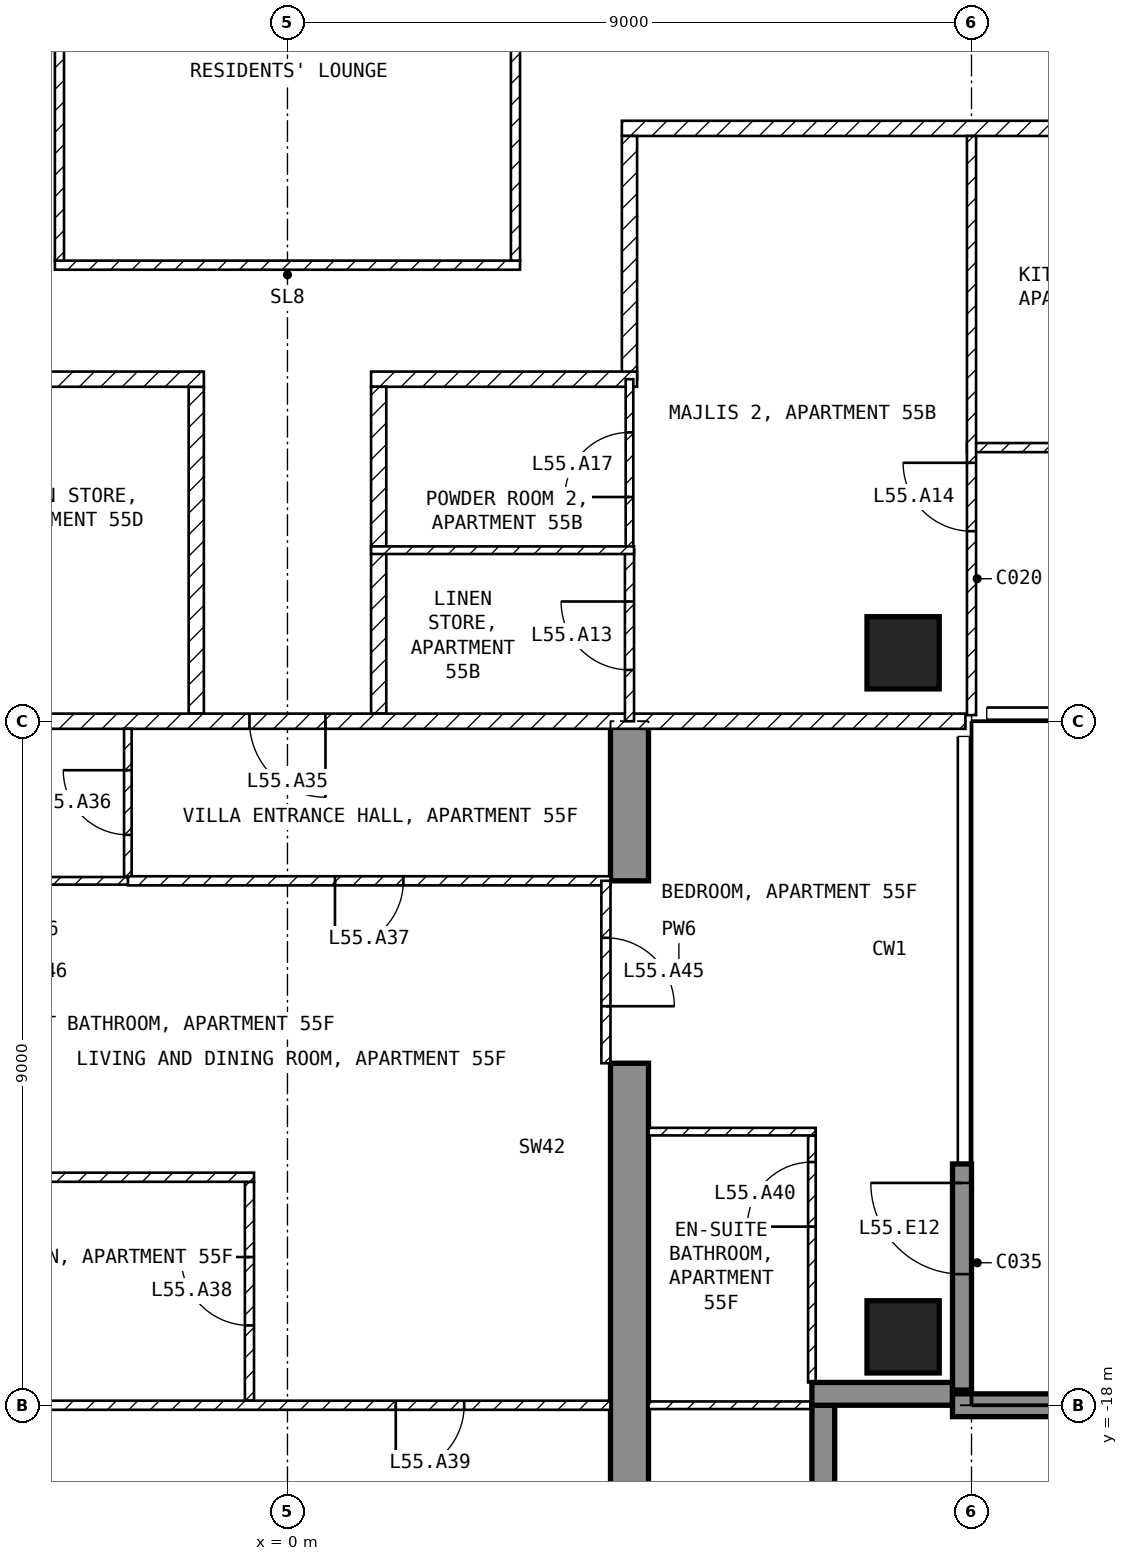
"""IFC4 building model, lengths in metres.
Left out: names, types, materials, properties, quantities, classifications, styles, units other than length and angle.
Written with IfcOpenShell. Run it as: python <this file> out.ifc"""

import sys

from ifc_helpers import new_model, si_unit, direction, frame, frame_2d, origin, origin_2d, place, context, subcontext, project, spatial, polyline, rectangle, outline, extrude, element, fill, save


model = new_model("IFC4")
c1 = context("Model", 3, precision=1e-05, world=origin(), true_north=direction((0.0, 1.0)))
c2 = subcontext(c1, "Body", "Model", "MODEL_VIEW")
j1 = project(units=[si_unit("LENGTHUNIT", "METRE"), si_unit("PLANEANGLEUNIT", "RADIAN")], contexts=[c1])
p1 = place(None, origin())
s1 = spatial("IfcSite", under=j1, at=p1, CompositionType="ELEMENT")
p2 = place(p1, origin())
s2 = spatial("IfcBuilding", under=s1, at=p2, CompositionType="ELEMENT")
p3 = place(p2, frame((0.0, 0.0, 219.1)))
s3 = spatial("IfcBuildingStorey", under=s2, at=p3, CompositionType="ELEMENT", Elevation=219.1)
for number, where, z_axis, x_axis in (
    (1, (8.1, -17.1, -0.25), (0.0, 0.0, 1.0), (1.0, 0.0, 0.0)),
    (2, (8.1, -8.1, -0.25), (0.0, 0.0, 1.0), (1.0, 0.0, 0.0)),
):
    element("IfcColumn", number, at=place(p3, frame(where, z_axis=z_axis, x_axis=x_axis)), inside=s3, PredefinedType="COLUMN", context=c2, shape_type="SweptSolid", body=[
        extrude(rectangle(XDim=0.95, YDim=0.95, at=origin_2d()), origin(), (0.0, 0.0, 1.0), 3.45),
    ])
p4 = place(p3, frame((4.25, -20.225, -0.25), z_axis=(1.0, 0.0, 0.0), x_axis=(0.0, 1.0, 0.0)))
e3 = element("IfcWall", 3, at=p4, inside=s3, PredefinedType="SHEAR", context=c2, shape_type="SweptSolid", body=[
    extrude(outline(polyline([(0.0, 0.0), (6.725, 0.0), (6.725, 2.65), (9.125, 2.65), (9.125, 0.0), (11.225, 0.0), (11.225, 3.45), (0.0, 3.45), (0.0, 0.0)])), origin(), (0.0, 0.0, 1.0), 0.5),
])
p5 = place(p3, frame((8.875, -17.8, 0.0), z_axis=(0.0, 0.0, 1.0), x_axis=(0.0, 1.0, 0.0)))
e4 = element("IfcWall", 4, at=p5, inside=s3, PredefinedType="SOLIDWALL", context=c2, shape_type="SweptSolid", body=[
    extrude(rectangle(XDim=2.975, YDim=0.25, at=frame_2d((1.488, 0.0))), origin(), (0.0, 0.0, 1.0), 3.2),
])
p6 = place(p5, frame((1.525, 0.0, 0.0)))
e5 = element("IfcOpeningElement", 5, at=p6, cuts=e4, PredefinedType="OPENING", context=c2, shape_type="SweptSolid", body=[
    extrude(rectangle(XDim=1.2, YDim=2.4, at=frame_2d((0.6, 1.2))), frame((0.0, 0.135, 0.0), z_axis=(0.0, -1.0, 0.0), x_axis=(1.0, 0.0, 0.0)), (0.0, 0.0, 1.0), 0.27),
])
p7 = place(p3, frame((7.05, -19.8, 0.0), z_axis=(0.0, 0.0, 1.0), x_axis=(0.0, 1.0, 0.0)))
e6 = element("IfcWall", 6, at=p7, inside=s3, PredefinedType="SOLIDWALL", context=c2, shape_type="SweptSolid", body=[
    extrude(rectangle(XDim=1.8, YDim=0.3, at=frame_2d((0.9, 0.0))), origin(), (0.0, 0.0, 1.0), 3.2),
])
p8 = place(p3, frame((6.9, -17.85, 0.0), z_axis=(0.0, 0.0, 1.0), x_axis=(1.0, 0.0, 0.0)))
e7 = element("IfcWall", 7, at=p8, inside=s3, PredefinedType="SOLIDWALL", context=c2, shape_type="SweptSolid", body=[
    extrude(rectangle(XDim=1.85, YDim=0.3, at=frame_2d((0.925, 0.0))), origin(), (0.0, 0.0, 1.0), 3.2),
])
p9 = place(p3, frame((8.75, -18.0, 0.0), z_axis=(0.0, 0.0, 1.0), x_axis=(1.0, 0.0, 0.0)))
e8 = element("IfcWall", 8, at=p9, inside=s3, PredefinedType="SOLIDWALL", context=c2, shape_type="SweptSolid", body=[
    extrude(rectangle(XDim=2.95, YDim=0.3, at=frame_2d((1.475, 0.0))), origin(), (0.0, 0.0, 1.0), 3.2),
])
p10 = place(p3, frame((-3.06, -3.0, 0.0), z_axis=(0.0, 0.0, 1.0), x_axis=(1.0, 0.0, 0.0)))
e9 = element("IfcWall", 9, at=p10, inside=s3, PredefinedType="PARTITIONING", context=c2, shape_type="SweptSolid", body=[
    extrude(rectangle(XDim=6.12, YDim=0.12, at=frame_2d((3.06, 0.0))), origin(), (0.0, 0.0, 1.0), 3.2),
])
for number, where, z_axis, x_axis in (
    (10, (3.0, -2.94, 0.0), (0.0, 0.0, 1.0), (0.0, 1.0, 0.0)),
    (11, (-3.0, 2.94, 0.0), (0.0, 0.0, 1.0), (0.0, -1.0, 0.0)),
):
    element("IfcWall", number, at=place(p3, frame(where, z_axis=z_axis, x_axis=x_axis)), inside=s3, PredefinedType="PARTITIONING", context=c2, shape_type="SweptSolid", body=[
        extrude(rectangle(XDim=5.88, YDim=0.12, at=frame_2d((2.94, 0.0))), origin(), (0.0, 0.0, 1.0), 3.2),
    ])
p11 = place(p3, frame((21.6, -1.2, 0.0), z_axis=(0.0, 0.0, 1.0), x_axis=(-1.0, 0.0, 0.0)))
e12 = element("IfcWall", 12, at=p11, inside=s3, PredefinedType="PARTITIONING", context=c2, shape_type="SweptSolid", body=[
    extrude(rectangle(XDim=17.2, YDim=0.2, at=frame_2d((8.6, 0.0))), origin(), (0.0, 0.0, 1.0), 3.2),
])
p12 = place(p11, frame((4.9, 0.0, 0.0)))
e13 = element("IfcOpeningElement", 13, at=p12, cuts=e12, PredefinedType="OPENING", context=c2, shape_type="SweptSolid", body=[
    extrude(rectangle(XDim=1.0, YDim=2.1, at=frame_2d((0.5, 1.05))), frame((0.0, 0.11, 0.0), z_axis=(0.0, -1.0, 0.0), x_axis=(1.0, 0.0, 0.0)), (0.0, 0.0, 1.0), 0.22),
])
p13 = place(p3, frame((4.5, -1.3, 0.0), z_axis=(0.0, 0.0, 1.0), x_axis=(0.0, -1.0, 0.0)))
e14 = element("IfcWall", 14, at=p13, inside=s3, PredefinedType="PARTITIONING", context=c2, shape_type="SweptSolid", body=[
    extrude(rectangle(XDim=3.2, YDim=0.2, at=frame_2d((1.6, 0.0))), origin(), (0.0, 0.0, 1.0), 3.2),
])
p14 = place(p3, frame((4.6, -4.5, 0.0), z_axis=(0.0, 0.0, 1.0), x_axis=(-1.0, 0.0, 0.0)))
e15 = element("IfcWall", 15, at=p14, inside=s3, PredefinedType="PARTITIONING", context=c2, shape_type="SweptSolid", body=[
    extrude(rectangle(XDim=3.5, YDim=0.2, at=frame_2d((1.75, 0.0))), origin(), (0.0, 0.0, 1.0), 3.2),
])
for number, where, z_axis, x_axis in (
    (16, (1.2, -4.6, 0.0), (0.0, 0.0, 1.0), (0.0, -1.0, 0.0)),
    (17, (-1.2, -8.9, 0.0), (0.0, 0.0, 1.0), (0.0, 1.0, 0.0)),
):
    element("IfcWall", number, at=place(p3, frame(where, z_axis=z_axis, x_axis=x_axis)), inside=s3, PredefinedType="PARTITIONING", context=c2, shape_type="SweptSolid", body=[
        extrude(rectangle(XDim=4.3, YDim=0.2, at=frame_2d((2.15, 0.0))), origin(), (0.0, 0.0, 1.0), 3.2),
    ])
p15 = place(p3, frame((-1.1, -4.5, 0.0), z_axis=(0.0, 0.0, 1.0), x_axis=(-1.0, 0.0, 0.0)))
e18 = element("IfcWall", 18, at=p15, inside=s3, PredefinedType="PARTITIONING", context=c2, shape_type="SweptSolid", body=[
    extrude(rectangle(XDim=3.46, YDim=0.2, at=frame_2d((1.73, 0.0))), origin(), (0.0, 0.0, 1.0), 3.2),
])
p16 = place(p3, frame((8.92, -9.0, 0.0), z_axis=(0.0, 0.0, 1.0), x_axis=(-1.0, 0.0, 0.0)))
e19 = element("IfcWall", 19, at=p16, inside=s3, PredefinedType="PARTITIONING", context=c2, shape_type="SweptSolid", body=[
    extrude(rectangle(XDim=17.84, YDim=0.2, at=frame_2d((8.92, 0.0))), origin(), (0.0, 0.0, 1.0), 3.2),
])
p17 = place(p16, frame((8.42, 0.0, 0.0)))
e20 = element("IfcOpeningElement", 20, at=p17, cuts=e19, PredefinedType="OPENING", context=c2, shape_type="SweptSolid", body=[
    extrude(rectangle(XDim=1.0, YDim=2.1, at=frame_2d((0.5, 1.05))), frame((0.0, 0.11, 0.0), z_axis=(0.0, -1.0, 0.0), x_axis=(1.0, 0.0, 0.0)), (0.0, 0.0, 1.0), 0.22),
])
p18 = place(p3, frame((12.3, -5.4, 0.0), z_axis=(0.0, 0.0, 1.0), x_axis=(-1.0, 0.0, 0.0)))
e21 = element("IfcWall", 21, at=p18, inside=s3, PredefinedType="PARTITIONING", context=c2, shape_type="SweptSolid", body=[
    extrude(rectangle(XDim=3.36, YDim=0.12, at=frame_2d((1.68, 0.0))), origin(), (0.0, 0.0, 1.0), 3.2),
])
p19 = place(p18, frame((1.2, 0.0, 0.0)))
e22 = element("IfcOpeningElement", 22, at=p19, cuts=e21, PredefinedType="OPENING", context=c2, shape_type="SweptSolid", body=[
    extrude(rectangle(XDim=0.9, YDim=2.1, at=frame_2d((0.45, 1.05))), frame((0.0, 0.07, 0.0), z_axis=(0.0, -1.0, 0.0), x_axis=(1.0, 0.0, 0.0)), (0.0, 0.0, 1.0), 0.14),
])
p20 = place(p3, frame((9.0, -8.92, 0.0), z_axis=(0.0, 0.0, 1.0), x_axis=(0.0, 1.0, 0.0)))
e23 = element("IfcWall", 23, at=p20, inside=s3, PredefinedType="PARTITIONING", context=c2, shape_type="SweptSolid", body=[
    extrude(rectangle(XDim=7.62, YDim=0.12, at=frame_2d((3.81, 0.0))), origin(), (0.0, 0.0, 1.0), 3.2),
])
p21 = place(p20, frame((2.42, 0.0, 0.0)))
e24 = element("IfcOpeningElement", 24, at=p21, cuts=e23, PredefinedType="OPENING", context=c2, shape_type="SweptSolid", body=[
    extrude(rectangle(XDim=0.9, YDim=2.1, at=frame_2d((0.45, 1.05))), frame((0.0, 0.07, 0.0), z_axis=(0.0, -1.0, 0.0), x_axis=(1.0, 0.0, 0.0)), (0.0, 0.0, 1.0), 0.14),
])
p22 = place(p3, frame((4.5, -6.75, 0.0), z_axis=(0.0, 0.0, 1.0), x_axis=(0.0, 1.0, 0.0)))
e25 = element("IfcWall", 25, at=p22, inside=s3, PredefinedType="PARTITIONING", context=c2, shape_type="SweptSolid", body=[
    extrude(rectangle(XDim=2.25, YDim=0.1, at=frame_2d((1.125, 0.0))), origin(), (0.0, 0.0, 1.0), 3.2),
])
p23 = place(p22, frame((0.7, 0.0, 0.0)))
e26 = element("IfcOpeningElement", 26, at=p23, cuts=e25, PredefinedType="OPENING", context=c2, shape_type="SweptSolid", body=[
    extrude(rectangle(XDim=0.85, YDim=2.1, at=frame_2d((0.425, 1.05))), frame((0.0, 0.06, 0.0), z_axis=(0.0, -1.0, 0.0), x_axis=(1.0, 0.0, 0.0)), (0.0, 0.0, 1.0), 0.12),
])
p24 = place(p3, frame((4.5, -9.0, 0.0), z_axis=(0.0, 0.0, 1.0), x_axis=(0.0, 1.0, 0.0)))
e27 = element("IfcWall", 27, at=p24, inside=s3, PredefinedType="PARTITIONING", context=c2, shape_type="SweptSolid", body=[
    extrude(rectangle(XDim=2.25, YDim=0.12, at=frame_2d((1.125, 0.0))), origin(), (0.0, 0.0, 1.0), 3.2),
])
p25 = place(p24, frame((0.675, 0.0, 0.0)))
e28 = element("IfcOpeningElement", 28, at=p25, cuts=e27, PredefinedType="OPENING", context=c2, shape_type="SweptSolid", body=[
    extrude(rectangle(XDim=0.9, YDim=2.1, at=frame_2d((0.45, 1.05))), frame((0.0, 0.07, 0.0), z_axis=(0.0, -1.0, 0.0), x_axis=(1.0, 0.0, 0.0)), (0.0, 0.0, 1.0), 0.14),
])
p26 = place(p3, frame((4.56, -6.75, 0.0), z_axis=(0.0, 0.0, 1.0), x_axis=(-1.0, 0.0, 0.0)))
e29 = element("IfcWall", 29, at=p26, inside=s3, PredefinedType="PARTITIONING", context=c2, shape_type="SweptSolid", body=[
    extrude(rectangle(XDim=3.46, YDim=0.1, at=frame_2d((1.73, 0.0))), origin(), (0.0, 0.0, 1.0), 3.2),
])
p27 = place(p3, frame((-2.1, -11.04, 0.0), z_axis=(0.0, 0.0, 1.0), x_axis=(0.0, 1.0, 0.0)))
e30 = element("IfcWall", 30, at=p27, inside=s3, PredefinedType="PARTITIONING", context=c2, shape_type="SweptSolid", body=[
    extrude(rectangle(XDim=1.94, YDim=0.1, at=frame_2d((0.97, 0.0))), origin(), (0.0, 0.0, 1.0), 3.2),
])
p28 = place(p27, frame((0.545, 0.0, 0.0)))
e31 = element("IfcOpeningElement", 31, at=p28, cuts=e30, PredefinedType="OPENING", context=c2, shape_type="SweptSolid", body=[
    extrude(rectangle(XDim=0.85, YDim=2.1, at=frame_2d((0.425, 1.05))), frame((0.0, 0.06, 0.0), z_axis=(0.0, -1.0, 0.0), x_axis=(1.0, 0.0, 0.0)), (0.0, 0.0, 1.0), 0.12),
])
p29 = place(p3, frame((4.25, -11.1, 0.0), z_axis=(0.0, 0.0, 1.0), x_axis=(-1.0, 0.0, 0.0)))
e32 = element("IfcWall", 32, at=p29, inside=s3, PredefinedType="PARTITIONING", context=c2, shape_type="SweptSolid", body=[
    extrude(rectangle(XDim=6.35, YDim=0.12, at=frame_2d((3.175, 0.0))), origin(), (0.0, 0.0, 1.0), 3.2),
])
p30 = place(p29, frame((2.725, 0.0, 0.0)))
e33 = element("IfcOpeningElement", 33, at=p30, cuts=e32, PredefinedType="OPENING", context=c2, shape_type="SweptSolid", body=[
    extrude(rectangle(XDim=0.9, YDim=2.1, at=frame_2d((0.45, 1.05))), frame((0.0, 0.07, 0.0), z_axis=(0.0, -1.0, 0.0), x_axis=(1.0, 0.0, 0.0)), (0.0, 0.0, 1.0), 0.14),
])
p31 = place(p3, frame((-2.1, -11.1, 0.0), z_axis=(0.0, 0.0, 1.0), x_axis=(-1.0, 0.0, 0.0)))
e34 = element("IfcWall", 34, at=p31, inside=s3, PredefinedType="PARTITIONING", context=c2, shape_type="SweptSolid", body=[
    extrude(rectangle(XDim=2.15, YDim=0.1, at=frame_2d((1.075, 0.0))), origin(), (0.0, 0.0, 1.0), 3.2),
])
p32 = place(p3, frame((-0.5, -17.94, 0.0), z_axis=(0.0, 0.0, 1.0), x_axis=(0.0, 1.0, 0.0)))
e35 = element("IfcWall", 35, at=p32, inside=s3, PredefinedType="PARTITIONING", context=c2, shape_type="SweptSolid", body=[
    extrude(rectangle(XDim=2.88, YDim=0.12, at=frame_2d((1.44, 0.0))), origin(), (0.0, 0.0, 1.0), 3.2),
])
p33 = place(p32, frame((0.99, 0.0, 0.0)))
e36 = element("IfcOpeningElement", 36, at=p33, cuts=e35, PredefinedType="OPENING", context=c2, shape_type="SweptSolid", body=[
    extrude(rectangle(XDim=0.9, YDim=2.1, at=frame_2d((0.45, 1.05))), frame((0.0, 0.07, 0.0), z_axis=(0.0, -1.0, 0.0), x_axis=(1.0, 0.0, 0.0)), (0.0, 0.0, 1.0), 0.14),
])
p34 = place(p3, frame((-0.44, -15.0, 0.0), z_axis=(0.0, 0.0, 1.0), x_axis=(-1.0, 0.0, 0.0)))
e37 = element("IfcWall", 37, at=p34, inside=s3, PredefinedType="PARTITIONING", context=c2, shape_type="SweptSolid", body=[
    extrude(rectangle(XDim=3.81, YDim=0.12, at=frame_2d((1.905, 0.0))), origin(), (0.0, 0.0, 1.0), 3.2),
])
p35 = place(p3, frame((4.25, -18.0, 0.0), z_axis=(0.0, 0.0, 1.0), x_axis=(-1.0, 0.0, 0.0)))
e38 = element("IfcWall", 38, at=p35, inside=s3, PredefinedType="PARTITIONING", context=c2, shape_type="SweptSolid", body=[
    extrude(rectangle(XDim=8.5, YDim=0.12, at=frame_2d((4.25, 0.0))), origin(), (0.0, 0.0, 1.0), 3.2),
])
p36 = place(p35, frame((1.925, 0.0, 0.0)))
e39 = element("IfcOpeningElement", 39, at=p36, cuts=e38, PredefinedType="OPENING", context=c2, shape_type="SweptSolid", body=[
    extrude(rectangle(XDim=0.9, YDim=2.1, at=frame_2d((0.45, 1.05))), frame((0.0, 0.07, 0.0), z_axis=(0.0, -1.0, 0.0), x_axis=(1.0, 0.0, 0.0)), (0.0, 0.0, 1.0), 0.14),
])
p37 = place(p3, frame((6.9, -17.7, 0.0), z_axis=(0.0, 0.0, 1.0), x_axis=(0.0, 1.0, 0.0)))
e40 = element("IfcWall", 40, at=p37, inside=s3, PredefinedType="PARTITIONING", context=c2, shape_type="SweptSolid", body=[
    extrude(rectangle(XDim=3.25, YDim=0.1, at=frame_2d((1.625, 0.0))), origin(), (0.0, 0.0, 1.0), 3.2),
])
p38 = place(p37, frame((2.05, 0.0, 0.0)))
e41 = element("IfcOpeningElement", 41, at=p38, cuts=e40, PredefinedType="OPENING", context=c2, shape_type="SweptSolid", body=[
    extrude(rectangle(XDim=0.85, YDim=2.1, at=frame_2d((0.425, 1.05))), frame((0.0, 0.06, 0.0), z_axis=(0.0, -1.0, 0.0), x_axis=(1.0, 0.0, 0.0)), (0.0, 0.0, 1.0), 0.12),
])
p39 = place(p3, frame((6.95, -14.4, 0.0), z_axis=(0.0, 0.0, 1.0), x_axis=(-1.0, 0.0, 0.0)))
e42 = element("IfcWall", 42, at=p39, inside=s3, PredefinedType="PARTITIONING", context=c2, shape_type="SweptSolid", body=[
    extrude(rectangle(XDim=2.2, YDim=0.1, at=frame_2d((1.1, 0.0))), origin(), (0.0, 0.0, 1.0), 3.2),
])
p40 = place(p3, frame((7.12, -18.0, 0.0), z_axis=(0.0, 0.0, 1.0), x_axis=(-1.0, 0.0, 0.0)))
e43 = element("IfcWall", 43, at=p40, inside=s3, PredefinedType="PARTITIONING", context=c2, shape_type="SweptSolid", body=[
    extrude(rectangle(XDim=2.37, YDim=0.1, at=frame_2d((1.185, 0.0))), origin(), (0.0, 0.0, 1.0), 3.2),
])
p41 = place(p3, frame((4.19, -11.1, 0.0), z_axis=(0.0, 0.0, 1.0), x_axis=(0.0, -1.0, 0.0)))
e44 = element("IfcWall", 44, at=p41, inside=s3, PredefinedType="PARTITIONING", context=c2, shape_type="SweptSolid", body=[
    extrude(rectangle(XDim=2.4, YDim=0.12, at=frame_2d((1.2, 0.0))), origin(), (0.0, 0.0, 1.0), 2.4),
])
p42 = place(p41, frame((0.75, 0.0, 0.0)))
e45 = element("IfcOpeningElement", 45, at=p42, cuts=e44, PredefinedType="OPENING", context=c2, shape_type="SweptSolid", body=[
    extrude(rectangle(XDim=0.9, YDim=2.1, at=frame_2d((0.45, 1.05))), frame((0.0, 0.07, 0.0), z_axis=(0.0, -1.0, 0.0), x_axis=(1.0, 0.0, 0.0)), (0.0, 0.0, 1.0), 0.14),
])
p43 = place(p6, origin())
e46 = element("IfcDoor", 46, at=p43, inside=s3, OperationType="SINGLE_SWING_RIGHT", PredefinedType="DOOR", context=c2, shape_type="SweptSolid", body=[
    extrude(rectangle(XDim=1.2, YDim=2.4, at=frame_2d((0.6, 1.2))), frame((0.0, 0.025, 0.0), z_axis=(0.0, -1.0, 0.0), x_axis=(1.0, 0.0, 0.0)), (0.0, 0.0, 1.0), 0.05),
])
fill(e5, e46)
p44 = place(p25, origin())
e47 = element("IfcDoor", 47, at=p44, inside=s3, OperationType="SINGLE_SWING_RIGHT", PredefinedType="DOOR", context=c2, shape_type="SweptSolid", body=[
    extrude(rectangle(XDim=0.9, YDim=2.1, at=frame_2d((0.45, 1.05))), frame((0.0, 0.025, 0.0), z_axis=(0.0, -1.0, 0.0), x_axis=(1.0, 0.0, 0.0)), (0.0, 0.0, 1.0), 0.05),
])
fill(e28, e47)
p45 = place(p21, origin())
e48 = element("IfcDoor", 48, at=p45, inside=s3, OperationType="SINGLE_SWING_RIGHT", PredefinedType="DOOR", context=c2, shape_type="SweptSolid", body=[
    extrude(rectangle(XDim=0.9, YDim=2.1, at=frame_2d((0.45, 1.05))), frame((0.0, 0.025, 0.0), z_axis=(0.0, -1.0, 0.0), x_axis=(1.0, 0.0, 0.0)), (0.0, 0.0, 1.0), 0.05),
])
fill(e24, e48)
p46 = place(p23, origin())
e49 = element("IfcDoor", 49, at=p46, inside=s3, OperationType="SINGLE_SWING_LEFT", PredefinedType="DOOR", context=c2, shape_type="SweptSolid", body=[
    extrude(rectangle(XDim=0.85, YDim=2.1, at=frame_2d((0.425, 1.05))), frame((0.0, 0.025, 0.0), z_axis=(0.0, -1.0, 0.0), x_axis=(1.0, 0.0, 0.0)), (0.0, 0.0, 1.0), 0.05),
])
fill(e26, e49)
p47 = place(p17, origin())
e50 = element("IfcDoor", 50, at=p47, inside=s3, OperationType="SINGLE_SWING_LEFT", PredefinedType="DOOR", context=c2, shape_type="SweptSolid", body=[
    extrude(rectangle(XDim=1.0, YDim=2.1, at=frame_2d((0.5, 1.05))), frame((0.0, 0.025, 0.0), z_axis=(0.0, -1.0, 0.0), x_axis=(1.0, 0.0, 0.0)), (0.0, 0.0, 1.0), 0.05),
])
fill(e20, e50)
p48 = place(p28, origin())
e51 = element("IfcDoor", 51, at=p48, inside=s3, OperationType="SINGLE_SWING_RIGHT", PredefinedType="DOOR", context=c2, shape_type="SweptSolid", body=[
    extrude(rectangle(XDim=0.85, YDim=2.1, at=frame_2d((0.425, 1.05))), frame((0.0, 0.025, 0.0), z_axis=(0.0, -1.0, 0.0), x_axis=(1.0, 0.0, 0.0)), (0.0, 0.0, 1.0), 0.05),
])
fill(e31, e51)
p49 = place(p30, origin())
e52 = element("IfcDoor", 52, at=p49, inside=s3, OperationType="SINGLE_SWING_RIGHT", PredefinedType="DOOR", context=c2, shape_type="SweptSolid", body=[
    extrude(rectangle(XDim=0.9, YDim=2.1, at=frame_2d((0.45, 1.05))), frame((0.0, 0.025, 0.0), z_axis=(0.0, -1.0, 0.0), x_axis=(1.0, 0.0, 0.0)), (0.0, 0.0, 1.0), 0.05),
])
fill(e33, e52)
p50 = place(p33, origin())
e53 = element("IfcDoor", 53, at=p50, inside=s3, OperationType="SINGLE_SWING_RIGHT", PredefinedType="DOOR", context=c2, shape_type="SweptSolid", body=[
    extrude(rectangle(XDim=0.9, YDim=2.1, at=frame_2d((0.45, 1.05))), frame((0.0, 0.025, 0.0), z_axis=(0.0, -1.0, 0.0), x_axis=(1.0, 0.0, 0.0)), (0.0, 0.0, 1.0), 0.05),
])
fill(e36, e53)
p51 = place(p36, origin())
e54 = element("IfcDoor", 54, at=p51, inside=s3, OperationType="SINGLE_SWING_RIGHT", PredefinedType="DOOR", context=c2, shape_type="SweptSolid", body=[
    extrude(rectangle(XDim=0.9, YDim=2.1, at=frame_2d((0.45, 1.05))), frame((0.0, 0.025, 0.0), z_axis=(0.0, -1.0, 0.0), x_axis=(1.0, 0.0, 0.0)), (0.0, 0.0, 1.0), 0.05),
])
fill(e39, e54)
p52 = place(p38, origin())
e55 = element("IfcDoor", 55, at=p52, inside=s3, OperationType="SINGLE_SWING_LEFT", PredefinedType="DOOR", context=c2, shape_type="SweptSolid", body=[
    extrude(rectangle(XDim=0.85, YDim=2.1, at=frame_2d((0.425, 1.05))), frame((0.0, 0.025, 0.0), z_axis=(0.0, -1.0, 0.0), x_axis=(1.0, 0.0, 0.0)), (0.0, 0.0, 1.0), 0.05),
])
fill(e41, e55)
p53 = place(p42, origin())
e56 = element("IfcDoor", 56, at=p53, inside=s3, OperationType="SINGLE_SWING_RIGHT", PredefinedType="DOOR", context=c2, shape_type="SweptSolid", body=[
    extrude(rectangle(XDim=0.9, YDim=2.1, at=frame_2d((0.45, 1.05))), frame((0.0, 0.025, 0.0), z_axis=(0.0, -1.0, 0.0), x_axis=(1.0, 0.0, 0.0)), (0.0, 0.0, 1.0), 0.05),
])
fill(e45, e56)
save(model, sys.argv[1])
